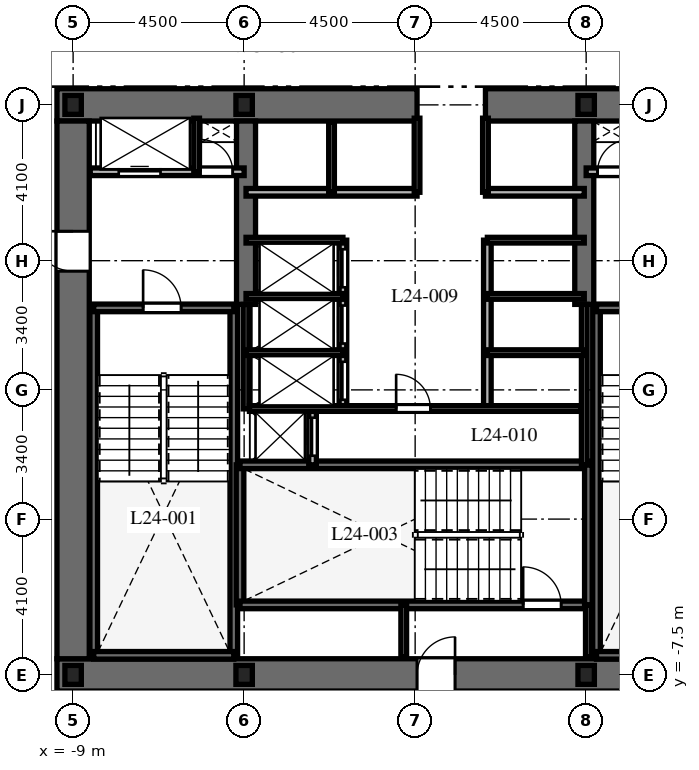
"""IFC4 building model, lengths in metres.
Left out: names, types, materials, properties, quantities, classifications, styles, units other than length and angle.
Written with IfcOpenShell. Run it as: python <this file> out.ifc"""

import sys

from ifc_helpers import new_model, si_unit, direction, frame, frame_2d, origin, origin_2d, place, context, subcontext, project, spatial, rectangle, i_section, extrude, element, fill, save


model = new_model("IFC4")
c1 = context("Model", 3, precision=1e-05, world=origin(), true_north=direction((0.0, 1.0)))
c2 = subcontext(c1, "Body", "Model", "MODEL_VIEW")
j1 = project(units=[si_unit("LENGTHUNIT", "METRE"), si_unit("PLANEANGLEUNIT", "RADIAN")], contexts=[c1])
p1 = place(None, origin())
s1 = spatial("IfcSite", under=j1, at=p1, CompositionType="ELEMENT")
p2 = place(p1, origin())
s2 = spatial("IfcBuilding", under=s1, at=p2, CompositionType="ELEMENT")
p3 = place(p2, frame((0.0, 0.0, 102.5)))
s3 = spatial("IfcBuildingStorey", under=s2, at=p3, CompositionType="ELEMENT", Elevation=102.5)
p4 = place(p3, frame((-9.425, -7.5, 0.0), z_axis=(0.0, 0.0, 1.0), x_axis=(1.0, 0.0, 0.0)))
e1 = element("IfcWall", 1, at=p4, inside=s3, PredefinedType="SHEAR", context=c2, shape_type="SweptSolid", body=[
    extrude(rectangle(XDim=18.85, YDim=0.85, at=frame_2d((9.425, 0.0))), origin(), (0.0, 0.0, 1.0), 3.7),
])
p5 = place(p4, frame((9.475, 0.0, 0.0)))
e2 = element("IfcOpeningElement", 2, at=p5, cuts=e1, PredefinedType="OPENING", context=c2, shape_type="SweptSolid", body=[
    extrude(rectangle(XDim=1.0, YDim=2.15, at=frame_2d((0.5, 1.075))), frame((0.0, 0.435, 0.0), z_axis=(0.0, -1.0, 0.0), x_axis=(1.0, 0.0, 0.0)), (0.0, 0.0, 1.0), 0.87),
])
p6 = place(p3, frame((-9.425, 7.5, 0.0), z_axis=(0.0, 0.0, 1.0), x_axis=(1.0, 0.0, 0.0)))
e3 = element("IfcWall", 3, at=p6, inside=s3, PredefinedType="SHEAR", context=c2, shape_type="SweptSolid", body=[
    extrude(rectangle(XDim=9.475, YDim=0.85, at=frame_2d((4.738, 0.0))), origin(), (0.0, 0.0, 1.0), 3.7),
])
p7 = place(p3, frame((1.85, 7.5, 0.0), z_axis=(0.0, 0.0, 1.0), x_axis=(1.0, 0.0, 0.0)))
e4 = element("IfcWall", 4, at=p7, inside=s3, PredefinedType="SHEAR", context=c2, shape_type="SweptSolid", body=[
    extrude(rectangle(XDim=7.575, YDim=0.85, at=frame_2d((3.788, 0.0))), origin(), (0.0, 0.0, 1.0), 3.7),
])
p8 = place(p3, frame((-9.0, -7.075, 0.0), z_axis=(0.0, 0.0, 1.0), x_axis=(0.0, 1.0, 0.0)))
e5 = element("IfcWall", 5, at=p8, inside=s3, PredefinedType="SHEAR", context=c2, shape_type="SweptSolid", body=[
    extrude(rectangle(XDim=14.15, YDim=0.85, at=frame_2d((7.075, 0.0))), origin(), (0.0, 0.0, 1.0), 3.7),
])
p9 = place(p8, frame((10.2, 0.0, 0.0)))
e6 = element("IfcOpeningElement", 6, at=p9, cuts=e5, PredefinedType="OPENING", context=c2, shape_type="SweptSolid", body=[
    extrude(rectangle(XDim=1.05, YDim=2.15, at=frame_2d((0.525, 1.075))), frame((0.0, 0.435, 0.0), z_axis=(0.0, -1.0, 0.0), x_axis=(1.0, 0.0, 0.0)), (0.0, 0.0, 1.0), 0.87),
])
for number, where, z_axis, x_axis in (
    (7, (-4.45, 2.25, 0.0), (0.0, 0.0, 1.0), (0.0, 1.0, 0.0)),
    (8, (4.45, 2.25, 0.0), (0.0, 0.0, 1.0), (0.0, 1.0, 0.0)),
):
    element("IfcWall", number, at=place(p3, frame(where, z_axis=z_axis, x_axis=x_axis)), inside=s3, PredefinedType="SHEAR", context=c2, shape_type="SweptSolid", body=[
        extrude(rectangle(XDim=4.825, YDim=0.5, at=frame_2d((2.413, 0.0))), origin(), (0.0, 0.0, 1.0), 3.7),
    ])
for number, where, z_axis, x_axis in (
    (9, (-8.458, -6.985, 0.0), (0.0, 0.0, 1.0), (0.0, 1.0, 0.0)),
    (10, (-4.772, -6.985, 0.0), (0.0, 0.0, 1.0), (0.0, 1.0, 0.0)),
):
    element("IfcWall", number, at=place(p3, frame(where, z_axis=z_axis, x_axis=x_axis)), inside=s3, PredefinedType="SHEAR", context=c2, shape_type="SweptSolid", body=[
        extrude(rectangle(XDim=9.143, YDim=0.2, at=frame_2d((4.572, 0.0))), origin(), (0.0, 0.0, 1.0), 3.7),
    ])
p10 = place(p3, frame((-8.458, -6.985, 0.0), z_axis=(0.0, 0.0, 1.0), x_axis=(1.0, 0.0, 0.0)))
e11 = element("IfcWall", 11, at=p10, inside=s3, PredefinedType="SHEAR", context=c2, shape_type="SweptSolid", body=[
    extrude(rectangle(XDim=3.686, YDim=0.2, at=frame_2d((1.843, 0.0))), origin(), (0.0, 0.0, 1.0), 3.7),
])
p11 = place(p3, frame((-8.458, 2.158, 0.0), z_axis=(0.0, 0.0, 1.0), x_axis=(1.0, 0.0, 0.0)))
e12 = element("IfcWall", 12, at=p11, inside=s3, PredefinedType="SHEAR", context=c2, shape_type="SweptSolid", body=[
    extrude(rectangle(XDim=3.686, YDim=0.2, at=frame_2d((1.843, 0.0))), origin(), (0.0, 0.0, 1.0), 3.7),
])
p12 = place(p11, frame((1.3, 0.0, 0.0)))
e13 = element("IfcOpeningElement", 13, at=p12, cuts=e12, PredefinedType="OPENING", context=c2, shape_type="SweptSolid", body=[
    extrude(rectangle(XDim=1.0, YDim=2.15, at=frame_2d((0.5, 1.075))), frame((0.0, 0.11, 0.0), z_axis=(0.0, -1.0, 0.0), x_axis=(1.0, 0.0, 0.0)), (0.0, 0.0, 1.0), 0.22),
])
p13 = place(p3, frame((4.772, -6.985, 0.0), z_axis=(0.0, 0.0, 1.0), x_axis=(0.0, 1.0, 0.0)))
e14 = element("IfcWall", 14, at=p13, inside=s3, PredefinedType="SHEAR", context=c2, shape_type="SweptSolid", body=[
    extrude(rectangle(XDim=9.143, YDim=0.2, at=frame_2d((4.572, 0.0))), origin(), (0.0, 0.0, 1.0), 3.7),
])
p14 = place(p3, frame((4.772, -6.985, 0.0), z_axis=(0.0, 0.0, 1.0), x_axis=(1.0, 0.0, 0.0)))
e15 = element("IfcWall", 15, at=p14, inside=s3, PredefinedType="SHEAR", context=c2, shape_type="SweptSolid", body=[
    extrude(rectangle(XDim=3.686, YDim=0.2, at=frame_2d((1.843, 0.0))), origin(), (0.0, 0.0, 1.0), 3.7),
])
p15 = place(p3, frame((4.772, 2.158, 0.0), z_axis=(0.0, 0.0, 1.0), x_axis=(1.0, 0.0, 0.0)))
e16 = element("IfcWall", 16, at=p15, inside=s3, PredefinedType="SHEAR", context=c2, shape_type="SweptSolid", body=[
    extrude(rectangle(XDim=3.686, YDim=0.2, at=frame_2d((1.843, 0.0))), origin(), (0.0, 0.0, 1.0), 3.7),
])
p16 = place(p15, frame((1.35, 0.0, 0.0)))
e17 = element("IfcOpeningElement", 17, at=p16, cuts=e16, PredefinedType="OPENING", context=c2, shape_type="SweptSolid", body=[
    extrude(rectangle(XDim=1.0, YDim=2.15, at=frame_2d((0.5, 1.075))), frame((0.0, 0.11, 0.0), z_axis=(0.0, -1.0, 0.0), x_axis=(1.0, 0.0, 0.0)), (0.0, 0.0, 1.0), 0.22),
])
p17 = place(p3, frame((-4.608, -5.658, 0.0), z_axis=(0.0, 0.0, 1.0), x_axis=(0.0, 1.0, 0.0)))
e18 = element("IfcWall", 18, at=p17, inside=s3, PredefinedType="SHEAR", context=c2, shape_type="SweptSolid", body=[
    extrude(rectangle(XDim=3.686, YDim=0.2, at=frame_2d((1.843, 0.0))), origin(), (0.0, 0.0, 1.0), 3.7),
])
p18 = place(p3, frame((-4.608, -5.658, 0.0), z_axis=(0.0, 0.0, 1.0), x_axis=(1.0, 0.0, 0.0)))
e19 = element("IfcWall", 19, at=p18, inside=s3, PredefinedType="SHEAR", context=c2, shape_type="SweptSolid", body=[
    extrude(rectangle(XDim=9.166, YDim=0.2, at=frame_2d((4.583, 0.0))), origin(), (0.0, 0.0, 1.0), 3.7),
])
p19 = place(p18, frame((7.45, 0.0, 0.0)))
e20 = element("IfcOpeningElement", 20, at=p19, cuts=e19, PredefinedType="OPENING", context=c2, shape_type="SweptSolid", body=[
    extrude(rectangle(XDim=1.0, YDim=2.15, at=frame_2d((0.5, 1.075))), frame((0.0, 0.11, 0.0), z_axis=(0.0, -1.0, 0.0), x_axis=(1.0, 0.0, 0.0)), (0.0, 0.0, 1.0), 0.22),
])
p20 = place(p3, frame((-4.608, -1.972, 0.0), z_axis=(0.0, 0.0, 1.0), x_axis=(1.0, 0.0, 0.0)))
e21 = element("IfcWall", 21, at=p20, inside=s3, PredefinedType="SHEAR", context=c2, shape_type="SweptSolid", body=[
    extrude(rectangle(XDim=9.166, YDim=0.2, at=frame_2d((4.583, 0.0))), origin(), (0.0, 0.0, 1.0), 3.7),
])
p21 = place(p3, frame((4.558, -5.658, 0.0), z_axis=(0.0, 0.0, 1.0), x_axis=(0.0, 1.0, 0.0)))
e22 = element("IfcWall", 22, at=p21, inside=s3, PredefinedType="SHEAR", context=c2, shape_type="SweptSolid", body=[
    extrude(rectangle(XDim=3.686, YDim=0.2, at=frame_2d((1.843, 0.0))), origin(), (0.0, 0.0, 1.0), 3.7),
])
for number, where, z_axis, x_axis in (
    (23, (-9.0, -7.5, 0.0), (0.0, 0.0, 1.0), (1.0, 0.0, 0.0)),
    (24, (-4.5, -7.5, 0.0), (0.0, 0.0, 1.0), (1.0, 0.0, 0.0)),
    (25, (4.5, -7.5, 0.0), (0.0, 0.0, 1.0), (1.0, 0.0, 0.0)),
    (26, (4.5, 7.5, 0.0), (0.0, 0.0, 1.0), (1.0, 0.0, 0.0)),
    (27, (-4.5, 7.5, 0.0), (0.0, 0.0, 1.0), (1.0, 0.0, 0.0)),
    (28, (-9.0, 7.5, 0.0), (0.0, 0.0, 1.0), (1.0, 0.0, 0.0)),
):
    element("IfcColumn", number, at=place(p3, frame(where, z_axis=z_axis, x_axis=x_axis)), inside=s3, PredefinedType="COLUMN", context=c2, shape_type="SweptSolid", body=[
        extrude(i_section(OverallWidth=0.432, OverallDepth=0.498, WebThickness=0.056, FlangeThickness=0.089, at=origin_2d()), origin(), (0.0, 0.0, 1.0), 3.7),
    ])
for number, where, z_axis, x_axis in (
    (29, (-0.3, -7.02, 0.0), (0.0, 0.0, 1.0), (0.0, 1.0, 0.0)),
    (30, (4.558, -7.02, 0.0), (0.0, 0.0, 1.0), (0.0, 1.0, 0.0)),
):
    element("IfcWall", number, at=place(p3, frame(where, z_axis=z_axis, x_axis=x_axis)), inside=s3, PredefinedType="PARTITIONING", context=c2, shape_type="SweptSolid", body=[
        extrude(rectangle(XDim=1.362, YDim=0.15, at=frame_2d((0.681, 0.0))), origin(), (0.0, 0.0, 1.0), 3.4),
    ])
p22 = place(p3, frame((-8.55, 5.74, 0.0), z_axis=(0.0, 0.0, 1.0), x_axis=(1.0, 0.0, 0.0)))
e31 = element("IfcWall", 31, at=p22, inside=s3, PredefinedType="PARTITIONING", context=c2, shape_type="SweptSolid", body=[
    extrude(rectangle(XDim=4.05, YDim=0.2, at=frame_2d((2.025, 0.0))), origin(), (0.0, 0.0, 1.0), 3.4),
])
p23 = place(p22, frame((0.75, 0.0, 0.0)))
e32 = element("IfcOpeningElement", 32, at=p23, cuts=e31, PredefinedType="OPENING", context=c2, shape_type="SweptSolid", body=[
    extrude(rectangle(XDim=1.1, YDim=2.2, at=frame_2d((0.55, 1.1))), frame((0.0, 0.11, 0.0), z_axis=(0.0, -1.0, 0.0), x_axis=(1.0, 0.0, 0.0)), (0.0, 0.0, 1.0), 0.22),
])
p24 = place(p22, frame((2.9, 0.0, 0.0)))
e33 = element("IfcOpeningElement", 33, at=p24, cuts=e31, PredefinedType="OPENING", context=c2, shape_type="SweptSolid", body=[
    extrude(rectangle(XDim=0.85, YDim=2.03, at=frame_2d((0.425, 1.015))), frame((0.0, 0.11, 0.0), z_axis=(0.0, -1.0, 0.0), x_axis=(1.0, 0.0, 0.0)), (0.0, 0.0, 1.0), 0.22),
])
p25 = place(p3, frame((-5.75, 5.74, 0.0), z_axis=(0.0, 0.0, 1.0), x_axis=(0.0, 1.0, 0.0)))
e34 = element("IfcWall", 34, at=p25, inside=s3, PredefinedType="PARTITIONING", context=c2, shape_type="SweptSolid", body=[
    extrude(rectangle(XDim=1.41, YDim=0.15, at=frame_2d((0.705, 0.0))), origin(), (0.0, 0.0, 1.0), 3.4),
])
p26 = place(p3, frame((4.5, 5.74, 0.0), z_axis=(0.0, 0.0, 1.0), x_axis=(1.0, 0.0, 0.0)))
e35 = element("IfcWall", 35, at=p26, inside=s3, PredefinedType="PARTITIONING", context=c2, shape_type="SweptSolid", body=[
    extrude(rectangle(XDim=4.05, YDim=0.2, at=frame_2d((2.025, 0.0))), origin(), (0.0, 0.0, 1.0), 3.4),
])
p27 = place(p26, frame((0.3, 0.0, 0.0)))
e36 = element("IfcOpeningElement", 36, at=p27, cuts=e35, PredefinedType="OPENING", context=c2, shape_type="SweptSolid", body=[
    extrude(rectangle(XDim=0.85, YDim=2.03, at=frame_2d((0.425, 1.015))), frame((0.0, 0.11, 0.0), z_axis=(0.0, -1.0, 0.0), x_axis=(1.0, 0.0, 0.0)), (0.0, 0.0, 1.0), 0.22),
])
p28 = place(p26, frame((2.15, 0.0, 0.0)))
e37 = element("IfcOpeningElement", 37, at=p28, cuts=e35, PredefinedType="OPENING", context=c2, shape_type="SweptSolid", body=[
    extrude(rectangle(XDim=1.1, YDim=2.2, at=frame_2d((0.55, 1.1))), frame((0.0, 0.11, 0.0), z_axis=(0.0, -1.0, 0.0), x_axis=(1.0, 0.0, 0.0)), (0.0, 0.0, 1.0), 0.22),
])
p29 = place(p3, frame((-2.7, -1.972, 0.0), z_axis=(0.0, 0.0, 1.0), x_axis=(0.0, 1.0, 0.0)))
e38 = element("IfcWall", 38, at=p29, inside=s3, PredefinedType="PARTITIONING", context=c2, shape_type="SweptSolid", body=[
    extrude(rectangle(XDim=1.472, YDim=0.2, at=frame_2d((0.736, 0.0))), origin(), (0.0, 0.0, 1.0), 3.4),
])
p30 = place(p29, frame((0.24, 0.0, 0.0)))
e39 = element("IfcOpeningElement", 39, at=p30, cuts=e38, PredefinedType="OPENING", context=c2, shape_type="SweptSolid", body=[
    extrude(rectangle(XDim=1.0, YDim=2.2, at=frame_2d((0.5, 1.1))), frame((0.0, 0.11, 0.0), z_axis=(0.0, -1.0, 0.0), x_axis=(1.0, 0.0, 0.0)), (0.0, 0.0, 1.0), 0.22),
])
p31 = place(p3, frame((-4.45, 5.2, 0.0), z_axis=(0.0, 0.0, 1.0), x_axis=(1.0, 0.0, 0.0)))
e40 = element("IfcWall", 40, at=p31, inside=s3, PredefinedType="PARTITIONING", context=c2, shape_type="SweptSolid", body=[
    extrude(rectangle(XDim=4.5, YDim=0.2, at=frame_2d((2.25, 0.0))), origin(), (0.0, 0.0, 1.0), 3.4),
])
p32 = place(p3, frame((1.85, 5.2, 0.0), z_axis=(0.0, 0.0, 1.0), x_axis=(1.0, 0.0, 0.0)))
e41 = element("IfcWall", 41, at=p32, inside=s3, PredefinedType="PARTITIONING", context=c2, shape_type="SweptSolid", body=[
    extrude(rectangle(XDim=2.6, YDim=0.2, at=frame_2d((1.3, 0.0))), origin(), (0.0, 0.0, 1.0), 3.4),
])
p33 = place(p3, frame((-2.2, 5.2, 0.0), z_axis=(0.0, 0.0, 1.0), x_axis=(0.0, 1.0, 0.0)))
e42 = element("IfcWall", 42, at=p33, inside=s3, PredefinedType="PARTITIONING", context=c2, shape_type="SweptSolid", body=[
    extrude(rectangle(XDim=1.85, YDim=0.15, at=frame_2d((0.925, 0.0))), origin(), (0.0, 0.0, 1.0), 3.4),
])
for number, where, z_axis, x_axis in (
    (43, (0.05, 5.2, 0.0), (0.0, 0.0, 1.0), (0.0, 1.0, 0.0)),
    (44, (1.85, 5.2, 0.0), (0.0, 0.0, 1.0), (0.0, 1.0, 0.0)),
):
    element("IfcWall", number, at=place(p3, frame(where, z_axis=z_axis, x_axis=x_axis)), inside=s3, PredefinedType="PARTITIONING", context=c2, shape_type="SweptSolid", body=[
        extrude(rectangle(XDim=1.95, YDim=0.15, at=frame_2d((0.975, 0.0))), origin(), (0.0, 0.0, 1.0), 3.4),
    ])
p34 = place(p3, frame((-4.45, -0.5, 0.0), z_axis=(0.0, 0.0, 1.0), x_axis=(0.0, 1.0, 0.0)))
e45 = element("IfcWall", 45, at=p34, inside=s3, PredefinedType="PARTITIONING", context=c2, shape_type="SweptSolid", body=[
    extrude(rectangle(XDim=2.75, YDim=0.15, at=frame_2d((1.375, 0.0))), origin(), (0.0, 0.0, 1.0), 3.4),
])
p35 = place(p3, frame((4.45, -1.972, 0.0), z_axis=(0.0, 0.0, 1.0), x_axis=(0.0, 1.0, 0.0)))
e46 = element("IfcWall", 46, at=p35, inside=s3, PredefinedType="PARTITIONING", context=c2, shape_type="SweptSolid", body=[
    extrude(rectangle(XDim=4.222, YDim=0.15, at=frame_2d((2.111, 0.0))), origin(), (0.0, 0.0, 1.0), 3.4),
])
p36 = place(p3, frame((-1.9, -0.5, 0.0), z_axis=(0.0, 0.0, 1.0), x_axis=(0.0, 1.0, 0.0)))
e47 = element("IfcWall", 47, at=p36, inside=s3, PredefinedType="PARTITIONING", context=c2, shape_type="SweptSolid", body=[
    extrude(rectangle(XDim=4.44, YDim=0.2, at=frame_2d((2.22, 0.0))), origin(), (0.0, 0.0, 1.0), 3.4),
])
p37 = place(p36, frame((0.24, 0.0, 0.0)))
e48 = element("IfcOpeningElement", 48, at=p37, cuts=e47, PredefinedType="OPENING", context=c2, shape_type="SweptSolid", body=[
    extrude(rectangle(XDim=1.0, YDim=2.2, at=frame_2d((0.5, 1.1))), frame((0.0, 0.11, 0.0), z_axis=(0.0, -1.0, 0.0), x_axis=(1.0, 0.0, 0.0)), (0.0, 0.0, 1.0), 0.22),
])
p38 = place(p36, frame((1.72, 0.0, 0.0)))
e49 = element("IfcOpeningElement", 49, at=p38, cuts=e47, PredefinedType="OPENING", context=c2, shape_type="SweptSolid", body=[
    extrude(rectangle(XDim=1.0, YDim=2.2, at=frame_2d((0.5, 1.1))), frame((0.0, 0.11, 0.0), z_axis=(0.0, -1.0, 0.0), x_axis=(1.0, 0.0, 0.0)), (0.0, 0.0, 1.0), 0.22),
])
p39 = place(p36, frame((3.2, 0.0, 0.0)))
e50 = element("IfcOpeningElement", 50, at=p39, cuts=e47, PredefinedType="OPENING", context=c2, shape_type="SweptSolid", body=[
    extrude(rectangle(XDim=1.0, YDim=2.2, at=frame_2d((0.5, 1.1))), frame((0.0, 0.11, 0.0), z_axis=(0.0, -1.0, 0.0), x_axis=(1.0, 0.0, 0.0)), (0.0, 0.0, 1.0), 0.22),
])
for number, where, z_axis, x_axis in (
    (51, (-4.45, 3.94, 0.0), (0.0, 0.0, 1.0), (1.0, 0.0, 0.0)),
    (52, (-4.45, 0.98, 0.0), (0.0, 0.0, 1.0), (1.0, 0.0, 0.0)),
    (53, (-4.45, 2.46, 0.0), (0.0, 0.0, 1.0), (1.0, 0.0, 0.0)),
):
    element("IfcWall", number, at=place(p3, frame(where, z_axis=z_axis, x_axis=x_axis)), inside=s3, PredefinedType="PARTITIONING", context=c2, shape_type="SweptSolid", body=[
        extrude(rectangle(XDim=2.55, YDim=0.15, at=frame_2d((1.275, 0.0))), origin(), (0.0, 0.0, 1.0), 3.4),
    ])
p40 = place(p3, frame((1.9, -0.5, 0.0), z_axis=(0.0, 0.0, 1.0), x_axis=(0.0, 1.0, 0.0)))
e54 = element("IfcWall", 54, at=p40, inside=s3, PredefinedType="PARTITIONING", context=c2, shape_type="SweptSolid", body=[
    extrude(rectangle(XDim=4.44, YDim=0.2, at=frame_2d((2.22, 0.0))), origin(), (0.0, 0.0, 1.0), 3.4),
])
for number, where, z_axis, x_axis in (
    (55, (1.9, 3.94, 0.0), (0.0, 0.0, 1.0), (1.0, 0.0, 0.0)),
    (56, (1.9, 0.98, 0.0), (0.0, 0.0, 1.0), (1.0, 0.0, 0.0)),
    (57, (1.9, 2.46, 0.0), (0.0, 0.0, 1.0), (1.0, 0.0, 0.0)),
):
    element("IfcWall", number, at=place(p3, frame(where, z_axis=z_axis, x_axis=x_axis)), inside=s3, PredefinedType="PARTITIONING", context=c2, shape_type="SweptSolid", body=[
        extrude(rectangle(XDim=2.55, YDim=0.15, at=frame_2d((1.275, 0.0))), origin(), (0.0, 0.0, 1.0), 3.4),
    ])
p41 = place(p3, frame((-4.36, -0.49, 0.0), z_axis=(0.0, 0.0, 1.0), x_axis=(1.0, 0.0, 0.0)))
e58 = element("IfcWall", 58, at=p41, inside=s3, PredefinedType="PARTITIONING", context=c2, shape_type="SweptSolid", body=[
    extrude(rectangle(XDim=8.72, YDim=0.15, at=frame_2d((4.36, 0.0))), origin(), (0.0, 0.0, 1.0), 3.4),
])
p42 = place(p41, frame((3.86, 0.0, 0.0)))
e59 = element("IfcOpeningElement", 59, at=p42, cuts=e58, PredefinedType="OPENING", context=c2, shape_type="SweptSolid", body=[
    extrude(rectangle(XDim=0.9, YDim=2.03, at=frame_2d((0.45, 1.015))), frame((0.0, 0.085, 0.0), z_axis=(0.0, -1.0, 0.0), x_axis=(1.0, 0.0, 0.0)), (0.0, 0.0, 1.0), 0.17),
])
p43 = place(p12, origin())
e60 = element("IfcDoor", 60, at=p43, inside=s3, OperationType="SINGLE_SWING_LEFT", PredefinedType="DOOR", context=c2, shape_type="SweptSolid", body=[
    extrude(rectangle(XDim=1.0, YDim=2.15, at=frame_2d((0.5, 1.075))), frame((0.0, 0.025, 0.0), z_axis=(0.0, -1.0, 0.0), x_axis=(1.0, 0.0, 0.0)), (0.0, 0.0, 1.0), 0.05),
])
fill(e13, e60)
p44 = place(p19, origin())
e61 = element("IfcDoor", 61, at=p44, inside=s3, OperationType="SINGLE_SWING_LEFT", PredefinedType="DOOR", context=c2, shape_type="SweptSolid", body=[
    extrude(rectangle(XDim=1.0, YDim=2.15, at=frame_2d((0.5, 1.075))), frame((0.0, 0.025, 0.0), z_axis=(0.0, -1.0, 0.0), x_axis=(1.0, 0.0, 0.0)), (0.0, 0.0, 1.0), 0.05),
])
fill(e20, e61)
p45 = place(p5, origin())
e62 = element("IfcDoor", 62, at=p45, inside=s3, OperationType="SINGLE_SWING_RIGHT", PredefinedType="DOOR", context=c2, shape_type="SweptSolid", body=[
    extrude(rectangle(XDim=1.0, YDim=2.15, at=frame_2d((0.5, 1.075))), frame((0.0, 0.025, 0.0), z_axis=(0.0, -1.0, 0.0), x_axis=(1.0, 0.0, 0.0)), (0.0, 0.0, 1.0), 0.05),
])
fill(e2, e62)
p46 = place(p9, origin())
e63 = element("IfcDoor", 63, at=p46, inside=s3, OperationType="SINGLE_SWING_RIGHT", PredefinedType="DOOR", context=c2, shape_type="SweptSolid", body=[
    extrude(rectangle(XDim=1.05, YDim=2.15, at=frame_2d((0.525, 1.075))), frame((0.0, 0.025, 0.0), z_axis=(0.0, -1.0, 0.0), x_axis=(1.0, 0.0, 0.0)), (0.0, 0.0, 1.0), 0.05),
])
fill(e6, e63)
p47 = place(p23, origin())
e64 = element("IfcDoor", 64, at=p47, inside=s3, OperationType="SLIDING_TO_LEFT", PredefinedType="DOOR", context=c2, shape_type="SweptSolid", body=[
    extrude(rectangle(XDim=1.1, YDim=2.2, at=frame_2d((0.55, 1.1))), frame((0.0, 0.025, 0.0), z_axis=(0.0, -1.0, 0.0), x_axis=(1.0, 0.0, 0.0)), (0.0, 0.0, 1.0), 0.05),
])
fill(e32, e64)
p48 = place(p24, origin())
e65 = element("IfcDoor", 65, at=p48, inside=s3, OperationType="SINGLE_SWING_LEFT", PredefinedType="DOOR", context=c2, shape_type="SweptSolid", body=[
    extrude(rectangle(XDim=0.85, YDim=2.03, at=frame_2d((0.425, 1.015))), frame((0.0, 0.025, 0.0), z_axis=(0.0, -1.0, 0.0), x_axis=(1.0, 0.0, 0.0)), (0.0, 0.0, 1.0), 0.05),
])
fill(e33, e65)
p49 = place(p27, origin())
e66 = element("IfcDoor", 66, at=p49, inside=s3, OperationType="SINGLE_SWING_RIGHT", PredefinedType="DOOR", context=c2, shape_type="SweptSolid", body=[
    extrude(rectangle(XDim=0.85, YDim=2.03, at=frame_2d((0.425, 1.015))), frame((0.0, 0.025, 0.0), z_axis=(0.0, -1.0, 0.0), x_axis=(1.0, 0.0, 0.0)), (0.0, 0.0, 1.0), 0.05),
])
fill(e36, e66)
p50 = place(p30, origin())
e67 = element("IfcDoor", 67, at=p50, inside=s3, OperationType="SLIDING_TO_LEFT", PredefinedType="DOOR", context=c2, shape_type="SweptSolid", body=[
    extrude(rectangle(XDim=1.0, YDim=2.2, at=frame_2d((0.5, 1.1))), frame((0.0, 0.025, 0.0), z_axis=(0.0, -1.0, 0.0), x_axis=(1.0, 0.0, 0.0)), (0.0, 0.0, 1.0), 0.05),
])
fill(e39, e67)
p51 = place(p37, origin())
e68 = element("IfcDoor", 68, at=p51, inside=s3, OperationType="SLIDING_TO_LEFT", PredefinedType="DOOR", context=c2, shape_type="SweptSolid", body=[
    extrude(rectangle(XDim=1.0, YDim=2.2, at=frame_2d((0.5, 1.1))), frame((0.0, 0.025, 0.0), z_axis=(0.0, -1.0, 0.0), x_axis=(1.0, 0.0, 0.0)), (0.0, 0.0, 1.0), 0.05),
])
fill(e48, e68)
p52 = place(p38, origin())
e69 = element("IfcDoor", 69, at=p52, inside=s3, OperationType="SLIDING_TO_LEFT", PredefinedType="DOOR", context=c2, shape_type="SweptSolid", body=[
    extrude(rectangle(XDim=1.0, YDim=2.2, at=frame_2d((0.5, 1.1))), frame((0.0, 0.025, 0.0), z_axis=(0.0, -1.0, 0.0), x_axis=(1.0, 0.0, 0.0)), (0.0, 0.0, 1.0), 0.05),
])
fill(e49, e69)
p53 = place(p39, origin())
e70 = element("IfcDoor", 70, at=p53, inside=s3, OperationType="SLIDING_TO_LEFT", PredefinedType="DOOR", context=c2, shape_type="SweptSolid", body=[
    extrude(rectangle(XDim=1.0, YDim=2.2, at=frame_2d((0.5, 1.1))), frame((0.0, 0.025, 0.0), z_axis=(0.0, -1.0, 0.0), x_axis=(1.0, 0.0, 0.0)), (0.0, 0.0, 1.0), 0.05),
])
fill(e50, e70)
p54 = place(p42, origin())
e71 = element("IfcDoor", 71, at=p54, inside=s3, OperationType="SINGLE_SWING_LEFT", PredefinedType="DOOR", context=c2, shape_type="SweptSolid", body=[
    extrude(rectangle(XDim=0.9, YDim=2.03, at=frame_2d((0.45, 1.015))), frame((0.0, 0.025, 0.0), z_axis=(0.0, -1.0, 0.0), x_axis=(1.0, 0.0, 0.0)), (0.0, 0.0, 1.0), 0.05),
])
fill(e59, e71)
save(model, sys.argv[1])
